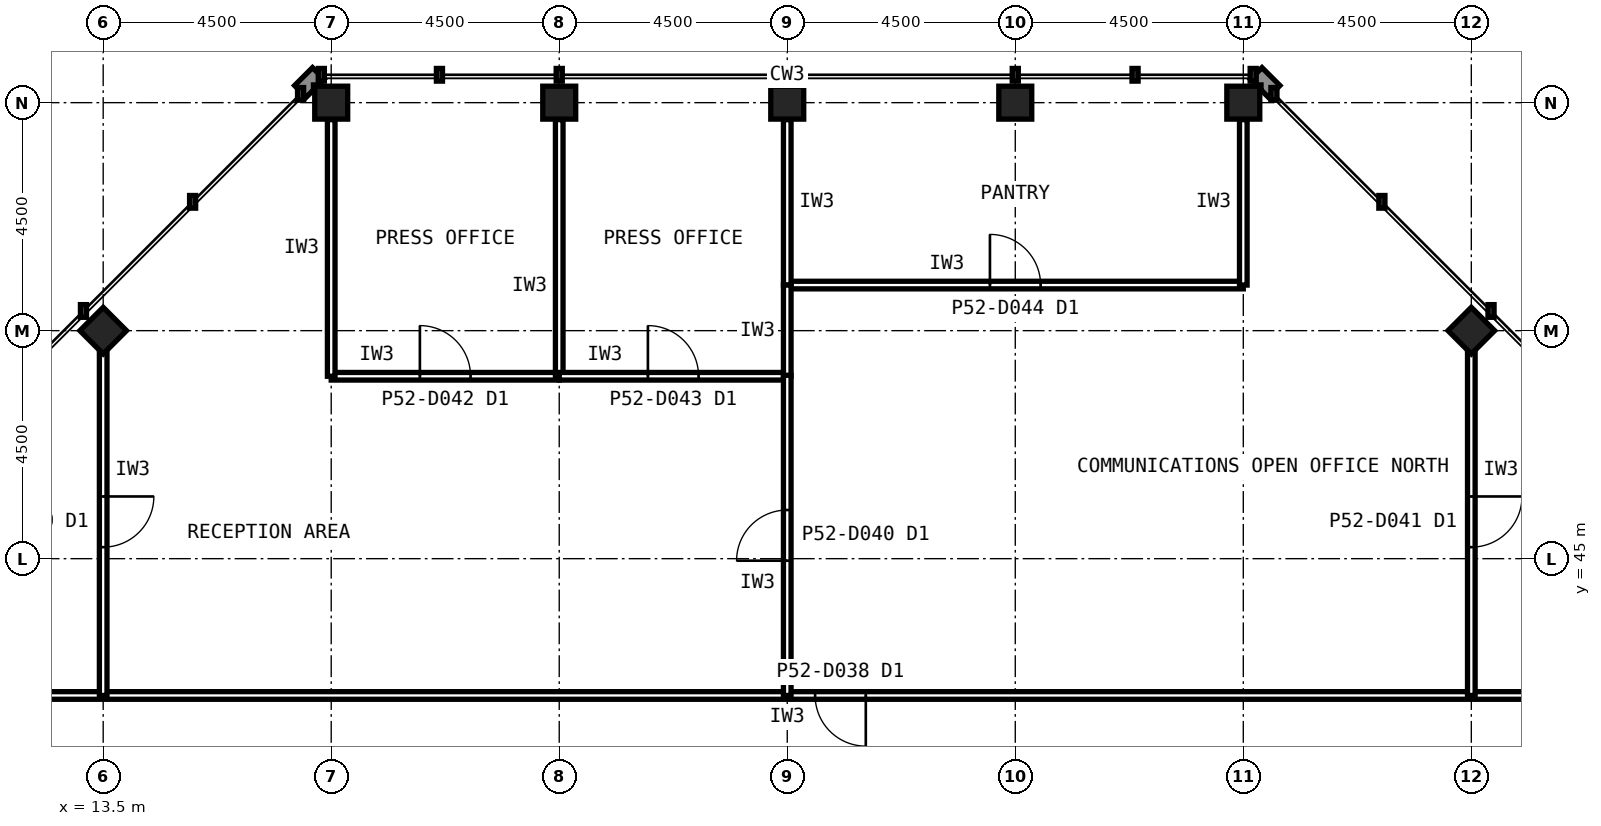
"""IFC4 building model, lengths in metres.
Left out: names, types, materials, properties, quantities, classifications, styles, units other than length and angle.
Written with IfcOpenShell. Run it as: python <this file> out.ifc"""

import sys

from ifc_helpers import new_model, si_unit, direction, frame, frame_2d, origin, origin_2d, place, context, subcontext, project, spatial, rectangle, hollow_rectangle, extrude, element, fill, save


model = new_model("IFC4")
c1 = context("Model", 3, precision=1e-05, world=origin(), true_north=direction((0.0, 1.0)))
c2 = subcontext(c1, "Body", "Model", "MODEL_VIEW")
j1 = project(units=[si_unit("LENGTHUNIT", "METRE"), si_unit("PLANEANGLEUNIT", "RADIAN")], contexts=[c1])
p1 = place(None, origin())
s1 = spatial("IfcSite", under=j1, at=p1, CompositionType="ELEMENT")
p2 = place(p1, origin())
s2 = spatial("IfcBuilding", under=s1, at=p2, CompositionType="ELEMENT")
p3 = place(p2, frame((0.0, 0.0, 222.6)))
s3 = spatial("IfcBuildingStorey", under=s2, at=p3, CompositionType="ELEMENT", Elevation=222.6)
for number, where, z_axis, x_axis in (
    (1, (36.0, 54.0, 0.0), (0.0, 0.0, 1.0), (1.0, 0.0, 0.0)),
    (2, (31.5, 54.0, 0.0), (0.0, 0.0, 1.0), (1.0, 0.0, 0.0)),
    (3, (27.0, 54.0, 0.0), (0.0, 0.0, 1.0), (1.0, 0.0, 0.0)),
    (4, (22.5, 54.0, 0.0), (0.0, 0.0, 1.0), (1.0, 0.0, 0.0)),
    (5, (18.0, 54.0, 0.0), (0.0, 0.0, 1.0), (1.0, 0.0, 0.0)),
    (6, (40.5, 49.5, 0.0), (0.0, 0.0, 1.0), (0.707, 0.707, 0.0)),
    (7, (13.5, 49.5, 0.0), (0.0, 0.0, 1.0), (0.707, 0.707, 0.0)),
):
    element("IfcColumn", number, at=place(p3, frame(where, z_axis=z_axis, x_axis=x_axis)), inside=s3, PredefinedType="COLUMN", context=c2, shape_type="SweptSolid", body=[
        extrude(hollow_rectangle(XDim=0.65, YDim=0.65, WallThickness=0.032, at=origin_2d()), origin(), (0.0, 0.0, 1.0), 4.0),
    ])
p4 = place(p3, frame((42.3, 42.3, 0.0), z_axis=(0.0, 0.0, 1.0), x_axis=(-1.0, 0.0, 0.0)))
e8 = element("IfcWall", 8, at=p4, inside=s3, PredefinedType="PARTITIONING", context=c2, shape_type="SweptSolid", body=[
    extrude(rectangle(XDim=30.6, YDim=0.15, at=frame_2d((15.3, 0.0))), origin(), (0.0, 0.0, 1.0), 3.84),
])
p5 = place(p4, frame((13.75, 0.0, 0.0)))
e9 = element("IfcOpeningElement", 9, at=p5, cuts=e8, PredefinedType="OPENING", context=c2, shape_type="SweptSolid", body=[
    extrude(rectangle(XDim=1.0, YDim=2.1, at=frame_2d((0.5, 1.05))), frame((0.0, 0.085, 0.0), z_axis=(0.0, -1.0, 0.0), x_axis=(1.0, 0.0, 0.0)), (0.0, 0.0, 1.0), 0.17),
])
p6 = place(p3, frame((27.0, 50.4, 0.0), z_axis=(0.0, 0.0, 1.0), x_axis=(1.0, 0.0, 0.0)))
e10 = element("IfcWall", 10, at=p6, inside=s3, PredefinedType="PARTITIONING", context=c2, shape_type="SweptSolid", body=[
    extrude(rectangle(XDim=9.0, YDim=0.15, at=frame_2d((4.5, 0.0))), origin(), (0.0, 0.0, 1.0), 3.84),
])
p7 = place(p6, frame((4.0, 0.0, 0.0)))
e11 = element("IfcOpeningElement", 11, at=p7, cuts=e10, PredefinedType="OPENING", context=c2, shape_type="SweptSolid", body=[
    extrude(rectangle(XDim=1.0, YDim=2.1, at=frame_2d((0.5, 1.05))), frame((0.0, 0.085, 0.0), z_axis=(0.0, -1.0, 0.0), x_axis=(1.0, 0.0, 0.0)), (0.0, 0.0, 1.0), 0.17),
])
for number, where, z_axis, x_axis in (
    (12, (36.0, 50.4, 0.0), (0.0, 0.0, 1.0), (0.0, 1.0, 0.0)),
    (13, (27.0, 53.665, 0.0), (0.0, 0.0, 1.0), (0.0, -1.0, 0.0)),
):
    element("IfcWall", number, at=place(p3, frame(where, z_axis=z_axis, x_axis=x_axis)), inside=s3, PredefinedType="PARTITIONING", context=c2, shape_type="SweptSolid", body=[
        extrude(rectangle(XDim=3.265, YDim=0.15, at=frame_2d((1.633, 0.0))), origin(), (0.0, 0.0, 1.0), 2.989),
    ])
p8 = place(p3, frame((18.0, 48.6, 0.0), z_axis=(0.0, 0.0, 1.0), x_axis=(1.0, 0.0, 0.0)))
e14 = element("IfcWall", 14, at=p8, inside=s3, PredefinedType="PARTITIONING", context=c2, shape_type="SweptSolid", body=[
    extrude(rectangle(XDim=4.5, YDim=0.15, at=frame_2d((2.25, 0.0))), origin(), (0.0, 0.0, 1.0), 3.84),
])
p9 = place(p8, frame((1.75, 0.0, 0.0)))
e15 = element("IfcOpeningElement", 15, at=p9, cuts=e14, PredefinedType="OPENING", context=c2, shape_type="SweptSolid", body=[
    extrude(rectangle(XDim=1.0, YDim=2.1, at=frame_2d((0.5, 1.05))), frame((0.0, 0.085, 0.0), z_axis=(0.0, -1.0, 0.0), x_axis=(1.0, 0.0, 0.0)), (0.0, 0.0, 1.0), 0.17),
])
for number, where, z_axis, x_axis in (
    (16, (22.5, 48.6, 0.0), (0.0, 0.0, 1.0), (0.0, 1.0, 0.0)),
    (17, (18.0, 53.665, 0.0), (0.0, 0.0, 1.0), (0.0, -1.0, 0.0)),
):
    element("IfcWall", number, at=place(p3, frame(where, z_axis=z_axis, x_axis=x_axis)), inside=s3, PredefinedType="PARTITIONING", context=c2, shape_type="SweptSolid", body=[
        extrude(rectangle(XDim=5.065, YDim=0.15, at=frame_2d((2.532, 0.0))), origin(), (0.0, 0.0, 1.0), 2.989),
    ])
p10 = place(p3, frame((22.5, 48.6, 0.0), z_axis=(0.0, 0.0, 1.0), x_axis=(1.0, 0.0, 0.0)))
e18 = element("IfcWall", 18, at=p10, inside=s3, PredefinedType="PARTITIONING", context=c2, shape_type="SweptSolid", body=[
    extrude(rectangle(XDim=4.5, YDim=0.15, at=frame_2d((2.25, 0.0))), origin(), (0.0, 0.0, 1.0), 3.84),
])
p11 = place(p10, frame((1.75, 0.0, 0.0)))
e19 = element("IfcOpeningElement", 19, at=p11, cuts=e18, PredefinedType="OPENING", context=c2, shape_type="SweptSolid", body=[
    extrude(rectangle(XDim=1.0, YDim=2.1, at=frame_2d((0.5, 1.05))), frame((0.0, 0.085, 0.0), z_axis=(0.0, -1.0, 0.0), x_axis=(1.0, 0.0, 0.0)), (0.0, 0.0, 1.0), 0.17),
])
p12 = place(p3, frame((27.0, 48.6, 0.0), z_axis=(0.0, 0.0, 1.0), x_axis=(0.0, 1.0, 0.0)))
e20 = element("IfcWall", 20, at=p12, inside=s3, PredefinedType="PARTITIONING", context=c2, shape_type="SweptSolid", body=[
    extrude(rectangle(XDim=1.8, YDim=0.15, at=frame_2d((0.9, 0.0))), origin(), (0.0, 0.0, 1.0), 2.989),
])
p13 = place(p3, frame((40.5, 49.155, 0.0), z_axis=(0.0, 0.0, 1.0), x_axis=(0.0, -1.0, 0.0)))
e21 = element("IfcWall", 21, at=p13, inside=s3, PredefinedType="PARTITIONING", context=c2, shape_type="SweptSolid", body=[
    extrude(rectangle(XDim=6.855, YDim=0.15, at=frame_2d((3.427, 0.0))), origin(), (0.0, 0.0, 1.0), 2.989),
])
p14 = place(p13, frame((2.927, 0.0, 0.0)))
e22 = element("IfcOpeningElement", 22, at=p14, cuts=e21, PredefinedType="OPENING", context=c2, shape_type="SweptSolid", body=[
    extrude(rectangle(XDim=1.0, YDim=2.1, at=frame_2d((0.5, 1.05))), frame((0.0, 0.085, 0.0), z_axis=(0.0, -1.0, 0.0), x_axis=(1.0, 0.0, 0.0)), (0.0, 0.0, 1.0), 0.17),
])
p15 = place(p3, frame((27.0, 42.3, 0.0), z_axis=(0.0, 0.0, 1.0), x_axis=(0.0, 1.0, 0.0)))
e23 = element("IfcWall", 23, at=p15, inside=s3, PredefinedType="PARTITIONING", context=c2, shape_type="SweptSolid", body=[
    extrude(rectangle(XDim=6.32, YDim=0.15, at=frame_2d((3.16, 0.0))), origin(), (0.0, 0.0, 1.0), 2.989),
])
p16 = place(p15, frame((2.66, 0.0, 0.0)))
e24 = element("IfcOpeningElement", 24, at=p16, cuts=e23, PredefinedType="OPENING", context=c2, shape_type="SweptSolid", body=[
    extrude(rectangle(XDim=1.0, YDim=2.1, at=frame_2d((0.5, 1.05))), frame((0.0, 0.085, 0.0), z_axis=(0.0, -1.0, 0.0), x_axis=(1.0, 0.0, 0.0)), (0.0, 0.0, 1.0), 0.17),
])
p17 = place(p3, frame((13.5, 49.155, 0.0), z_axis=(0.0, 0.0, 1.0), x_axis=(0.0, -1.0, 0.0)))
e25 = element("IfcWall", 25, at=p17, inside=s3, PredefinedType="PARTITIONING", context=c2, shape_type="SweptSolid", body=[
    extrude(rectangle(XDim=6.855, YDim=0.15, at=frame_2d((3.427, 0.0))), origin(), (0.0, 0.0, 1.0), 2.989),
])
p18 = place(p17, frame((2.927, 0.0, 0.0)))
e26 = element("IfcOpeningElement", 26, at=p18, cuts=e25, PredefinedType="OPENING", context=c2, shape_type="SweptSolid", body=[
    extrude(rectangle(XDim=1.0, YDim=2.1, at=frame_2d((0.5, 1.05))), frame((0.0, 0.085, 0.0), z_axis=(0.0, -1.0, 0.0), x_axis=(1.0, 0.0, 0.0)), (0.0, 0.0, 1.0), 0.17),
])
p19 = place(p5, origin())
e27 = element("IfcDoor", 27, at=p19, inside=s3, OperationType="SINGLE_SWING_LEFT", PredefinedType="DOOR", context=c2, shape_type="SweptSolid", body=[
    extrude(rectangle(XDim=1.0, YDim=2.1, at=frame_2d((0.5, 1.05))), frame((0.0, 0.025, 0.0), z_axis=(0.0, -1.0, 0.0), x_axis=(1.0, 0.0, 0.0)), (0.0, 0.0, 1.0), 0.05),
])
fill(e9, e27)
p20 = place(p7, origin())
e28 = element("IfcDoor", 28, at=p20, inside=s3, OperationType="SINGLE_SWING_LEFT", PredefinedType="DOOR", context=c2, shape_type="SweptSolid", body=[
    extrude(rectangle(XDim=1.0, YDim=2.1, at=frame_2d((0.5, 1.05))), frame((0.0, 0.025, 0.0), z_axis=(0.0, -1.0, 0.0), x_axis=(1.0, 0.0, 0.0)), (0.0, 0.0, 1.0), 0.05),
])
fill(e11, e28)
p21 = place(p9, origin())
e29 = element("IfcDoor", 29, at=p21, inside=s3, OperationType="SINGLE_SWING_LEFT", PredefinedType="DOOR", context=c2, shape_type="SweptSolid", body=[
    extrude(rectangle(XDim=1.0, YDim=2.1, at=frame_2d((0.5, 1.05))), frame((0.0, 0.025, 0.0), z_axis=(0.0, -1.0, 0.0), x_axis=(1.0, 0.0, 0.0)), (0.0, 0.0, 1.0), 0.05),
])
fill(e15, e29)
p22 = place(p11, origin())
e30 = element("IfcDoor", 30, at=p22, inside=s3, OperationType="SINGLE_SWING_LEFT", PredefinedType="DOOR", context=c2, shape_type="SweptSolid", body=[
    extrude(rectangle(XDim=1.0, YDim=2.1, at=frame_2d((0.5, 1.05))), frame((0.0, 0.025, 0.0), z_axis=(0.0, -1.0, 0.0), x_axis=(1.0, 0.0, 0.0)), (0.0, 0.0, 1.0), 0.05),
])
fill(e19, e30)
p23 = place(p14, origin())
e31 = element("IfcDoor", 31, at=p23, inside=s3, OperationType="SINGLE_SWING_LEFT", PredefinedType="DOOR", context=c2, shape_type="SweptSolid", body=[
    extrude(rectangle(XDim=1.0, YDim=2.1, at=frame_2d((0.5, 1.05))), frame((0.0, 0.025, 0.0), z_axis=(0.0, -1.0, 0.0), x_axis=(1.0, 0.0, 0.0)), (0.0, 0.0, 1.0), 0.05),
])
fill(e22, e31)
p24 = place(p16, origin())
e32 = element("IfcDoor", 32, at=p24, inside=s3, OperationType="SINGLE_SWING_LEFT", PredefinedType="DOOR", context=c2, shape_type="SweptSolid", body=[
    extrude(rectangle(XDim=1.0, YDim=2.1, at=frame_2d((0.5, 1.05))), frame((0.0, 0.025, 0.0), z_axis=(0.0, -1.0, 0.0), x_axis=(1.0, 0.0, 0.0)), (0.0, 0.0, 1.0), 0.05),
])
fill(e24, e32)
p25 = place(p18, origin())
e33 = element("IfcDoor", 33, at=p25, inside=s3, OperationType="SINGLE_SWING_LEFT", PredefinedType="DOOR", context=c2, shape_type="SweptSolid", body=[
    extrude(rectangle(XDim=1.0, YDim=2.1, at=frame_2d((0.5, 1.05))), frame((0.0, 0.025, 0.0), z_axis=(0.0, -1.0, 0.0), x_axis=(1.0, 0.0, 0.0)), (0.0, 0.0, 1.0), 0.05),
])
fill(e26, e33)
save(model, sys.argv[1])
